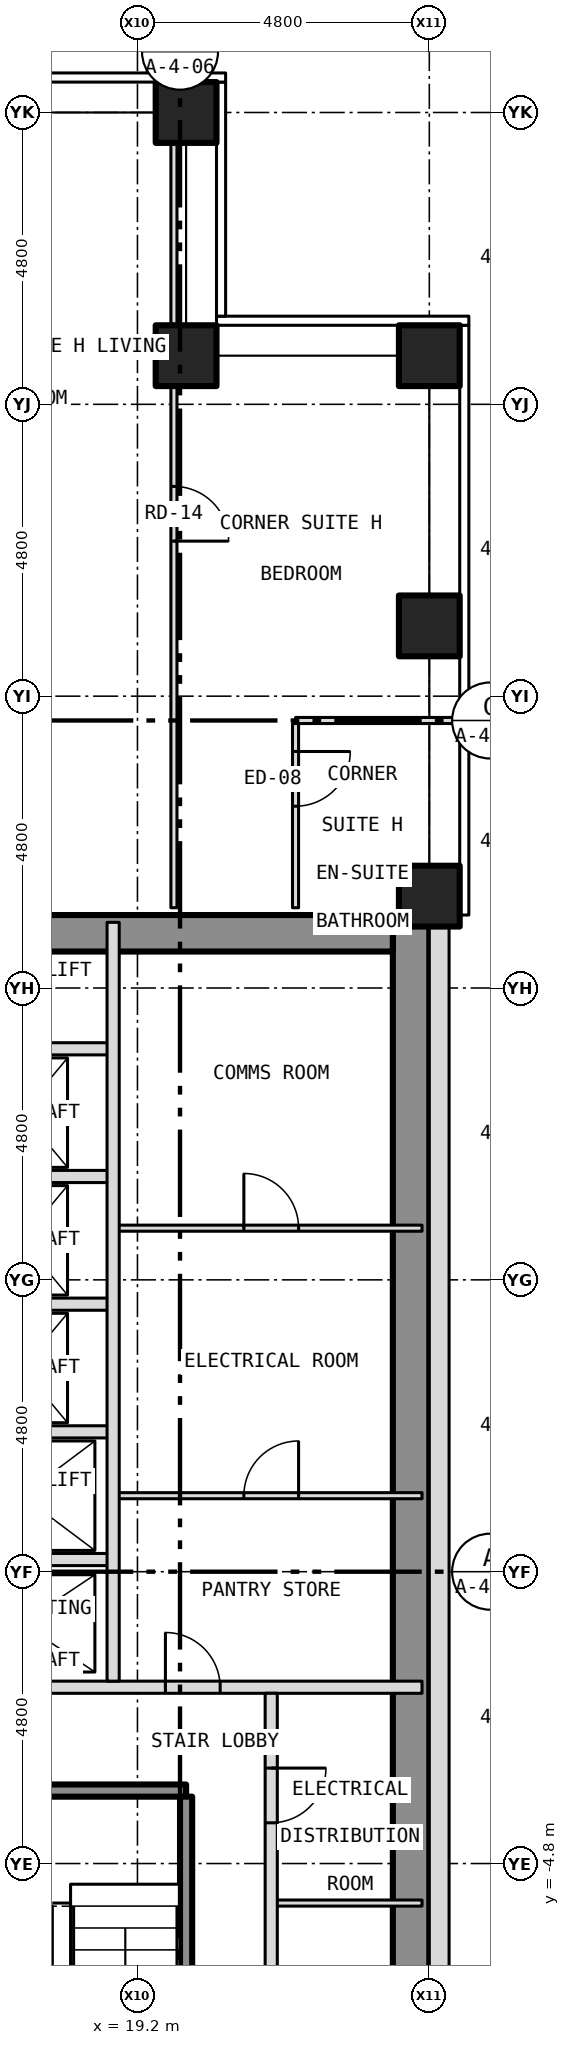
"""IFC4 building model, lengths in metres.
Left out: names, types, materials, properties, quantities, classifications, styles, units other than length and angle.
Written with IfcOpenShell. Run it as: python <this file> out.ifc"""

import sys

from ifc_helpers import new_model, si_unit, direction, frame, frame_2d, origin, origin_2d, place, context, subcontext, project, spatial, rectangle, hollow_rectangle, extrude, element, fill, save


model = new_model("IFC4")
c1 = context("Model", 3, precision=1e-05, world=origin(), true_north=direction((0.0, 1.0)))
c2 = subcontext(c1, "Body", "Model", "MODEL_VIEW")
j1 = project(units=[si_unit("LENGTHUNIT", "METRE"), si_unit("PLANEANGLEUNIT", "RADIAN")], contexts=[c1])
p1 = place(None, origin())
s1 = spatial("IfcSite", under=j1, at=p1, CompositionType="ELEMENT")
p2 = place(p1, origin())
s2 = spatial("IfcBuilding", under=s1, at=p2, CompositionType="ELEMENT")
p3 = place(p2, frame((0.0, 0.0, 67.0)))
s3 = spatial("IfcBuildingStorey", under=s2, at=p3, CompositionType="ELEMENT", Elevation=67.0)
for number, where, z_axis, x_axis in (
    (1, (20.0, 24.0, -0.15), (0.0, 0.0, 1.0), (1.0, 0.0, 0.0)),
    (2, (24.0, 11.111, -0.15), (0.0, 0.0, 1.0), (1.0, 0.0, 0.0)),
    (3, (24.0, 15.556, -0.15), (0.0, 0.0, 1.0), (1.0, 0.0, 0.0)),
    (4, (24.0, 20.0, -0.15), (0.0, 0.0, 1.0), (1.0, 0.0, 0.0)),
    (5, (20.0, 20.0, -0.15), (0.0, 0.0, 1.0), (1.0, 0.0, 0.0)),
):
    element("IfcColumn", number, at=place(p3, frame(where, z_axis=z_axis, x_axis=x_axis)), inside=s3, PredefinedType="COLUMN", context=c2, shape_type="SweptSolid", body=[
        extrude(hollow_rectangle(XDim=1.0, YDim=1.0, WallThickness=0.06, at=origin_2d()), origin(), (0.0, 0.0, 1.0), 3.5),
    ])
p4 = place(p3, frame((23.7, -10.8, 0.0), z_axis=(0.0, 0.0, 1.0), x_axis=(0.0, 1.0, 0.0)))
e6 = element("IfcWall", 6, at=p4, inside=s3, PredefinedType="SHEAR", context=c2, shape_type="SweptSolid", body=[
    extrude(rectangle(XDim=21.6, YDim=0.6, at=frame_2d((10.8, 0.0))), origin(), (0.0, 0.0, 1.0), 3.25),
])
p5 = place(p3, frame((16.4, 10.5, 0.0), z_axis=(0.0, 0.0, 1.0), x_axis=(1.0, 0.0, 0.0)))
e7 = element("IfcWall", 7, at=p5, inside=s3, PredefinedType="SHEAR", context=c2, shape_type="SweptSolid", body=[
    extrude(rectangle(XDim=7.0, YDim=0.6, at=frame_2d((3.5, 0.0))), origin(), (0.0, 0.0, 1.0), 3.25),
])
p6 = place(p3, frame((24.163, -10.8, 0.0), z_axis=(0.0, 0.0, 1.0), x_axis=(0.0, 1.0, 0.0)))
e8 = element("IfcWall", 8, at=p6, inside=s3, PredefinedType="SOLIDWALL", context=c2, shape_type="SweptSolid", body=[
    extrude(rectangle(XDim=21.6, YDim=0.325, at=frame_2d((10.8, 0.0))), origin(), (0.0, 0.0, 1.0), 3.5),
])
p7 = place(p6, frame((2.95, 0.0, 1.0)))
e9 = element("IfcOpeningElement", 9, at=p7, cuts=e8, PredefinedType="OPENING", context=c2, shape_type="SweptSolid", body=[
    extrude(rectangle(XDim=0.6, YDim=1.5, at=frame_2d((0.3, 0.75))), frame((0.0, 0.175, 0.0), z_axis=(0.0, -1.0, 0.0), x_axis=(1.0, 0.0, 0.0)), (0.0, 0.0, 1.0), 0.349),
])
p8 = place(p3, frame((21.4, -5.45, 0.0), z_axis=(0.0, 0.0, 1.0), x_axis=(1.0, 0.0, 0.0)))
e10 = element("IfcWall", 10, at=p8, inside=s3, PredefinedType="PARTITIONING", context=c2, shape_type="SweptSolid", body=[
    extrude(rectangle(XDim=2.48, YDim=0.1, at=frame_2d((1.24, 0.0))), origin(), (0.0, 0.0, 1.0), 3.25),
])
p9 = place(p3, frame((15.92, -3.6, 0.0), z_axis=(0.0, 0.0, 1.0), x_axis=(1.0, 0.0, 0.0)))
e11 = element("IfcWall", 11, at=p9, inside=s3, PredefinedType="SHEAR", context=c2, shape_type="SweptSolid", body=[
    extrude(rectangle(XDim=4.08, YDim=0.2, at=frame_2d((2.04, 0.0))), origin(), (0.0, 0.0, 1.0), 3.25),
])
p10 = place(p3, frame((15.92, -1.9, 0.0), z_axis=(0.0, 0.0, 1.0), x_axis=(1.0, 0.0, 0.0)))
e12 = element("IfcWall", 12, at=p10, inside=s3, PredefinedType="PARTITIONING", context=c2, shape_type="SweptSolid", body=[
    extrude(rectangle(XDim=7.96, YDim=0.2, at=frame_2d((3.98, 0.0))), origin(), (0.0, 0.0, 1.0), 3.25),
])
p11 = place(p10, frame((3.74, 0.0, 0.0)))
e13 = element("IfcOpeningElement", 13, at=p11, cuts=e12, PredefinedType="OPENING", context=c2, shape_type="SweptSolid", body=[
    extrude(rectangle(XDim=0.9, YDim=2.1, at=frame_2d((0.45, 1.05))), frame((0.0, 0.112, 0.0), z_axis=(0.0, -1.0, 0.0), x_axis=(1.0, 0.0, 0.0)), (0.0, 0.0, 1.0), 0.224),
])
p12 = place(p3, frame((15.92, 0.2, 0.0), z_axis=(0.0, 0.0, 1.0), x_axis=(1.0, 0.0, 0.0)))
e14 = element("IfcWall", 14, at=p12, inside=s3, PredefinedType="PARTITIONING", context=c2, shape_type="SweptSolid", body=[
    extrude(rectangle(XDim=2.88, YDim=0.2, at=frame_2d((1.44, 0.0))), origin(), (0.0, 0.0, 1.0), 3.25),
])
p13 = place(p3, frame((18.8, 1.25, 0.0), z_axis=(0.0, 0.0, 1.0), x_axis=(1.0, 0.0, 0.0)))
e15 = element("IfcWall", 15, at=p13, inside=s3, PredefinedType="PARTITIONING", context=c2, shape_type="SweptSolid", body=[
    extrude(rectangle(XDim=5.08, YDim=0.1, at=frame_2d((2.54, 0.0))), origin(), (0.0, 0.0, 1.0), 3.25),
])
p14 = place(p13, frame((2.15, 0.0, 0.0)))
e16 = element("IfcOpeningElement", 16, at=p14, cuts=e15, PredefinedType="OPENING", context=c2, shape_type="SweptSolid", body=[
    extrude(rectangle(XDim=0.9, YDim=2.1, at=frame_2d((0.45, 1.05))), frame((0.0, 0.062, 0.0), z_axis=(0.0, -1.0, 0.0), x_axis=(1.0, 0.0, 0.0)), (0.0, 0.0, 1.0), 0.124),
])
for number, where, z_axis, x_axis in (
    (17, (15.92, 2.3, 0.0), (0.0, 0.0, 1.0), (1.0, 0.0, 0.0)),
    (18, (15.92, 4.4, 0.0), (0.0, 0.0, 1.0), (1.0, 0.0, 0.0)),
):
    element("IfcWall", number, at=place(p3, frame(where, z_axis=z_axis, x_axis=x_axis)), inside=s3, PredefinedType="PARTITIONING", context=c2, shape_type="SweptSolid", body=[
        extrude(rectangle(XDim=2.88, YDim=0.2, at=frame_2d((1.44, 0.0))), origin(), (0.0, 0.0, 1.0), 3.25),
    ])
p15 = place(p3, frame((18.8, 5.65, 0.0), z_axis=(0.0, 0.0, 1.0), x_axis=(1.0, 0.0, 0.0)))
e19 = element("IfcWall", 19, at=p15, inside=s3, PredefinedType="PARTITIONING", context=c2, shape_type="SweptSolid", body=[
    extrude(rectangle(XDim=5.08, YDim=0.1, at=frame_2d((2.54, 0.0))), origin(), (0.0, 0.0, 1.0), 3.25),
])
p16 = place(p15, frame((2.15, 0.0, 0.0)))
e20 = element("IfcOpeningElement", 20, at=p16, cuts=e19, PredefinedType="OPENING", context=c2, shape_type="SweptSolid", body=[
    extrude(rectangle(XDim=0.9, YDim=2.1, at=frame_2d((0.45, 1.05))), frame((0.0, 0.062, 0.0), z_axis=(0.0, -1.0, 0.0), x_axis=(1.0, 0.0, 0.0)), (0.0, 0.0, 1.0), 0.124),
])
for number, where, z_axis, x_axis in (
    (21, (15.92, 6.5, 0.0), (0.0, 0.0, 1.0), (1.0, 0.0, 0.0)),
    (22, (15.92, 8.6, 0.0), (0.0, 0.0, 1.0), (1.0, 0.0, 0.0)),
):
    element("IfcWall", number, at=place(p3, frame(where, z_axis=z_axis, x_axis=x_axis)), inside=s3, PredefinedType="PARTITIONING", context=c2, shape_type="SweptSolid", body=[
        extrude(rectangle(XDim=2.88, YDim=0.2, at=frame_2d((1.44, 0.0))), origin(), (0.0, 0.0, 1.0), 3.25),
    ])
p17 = place(p3, frame((21.8, 14.0, 0.0), z_axis=(0.0, 0.0, 1.0), x_axis=(1.0, 0.0, 0.0)))
e23 = element("IfcWall", 23, at=p17, inside=s3, PredefinedType="PARTITIONING", context=c2, shape_type="SweptSolid", body=[
    extrude(rectangle(XDim=2.73, YDim=0.1, at=frame_2d((1.365, 0.0))), origin(), (0.0, 0.0, 1.0), 3.35),
])
p18 = place(p3, frame((18.8, -1.8, 0.0), z_axis=(0.0, 0.0, 1.0), x_axis=(0.0, 1.0, 0.0)))
e24 = element("IfcWall", 24, at=p18, inside=s3, PredefinedType="PARTITIONING", context=c2, shape_type="SweptSolid", body=[
    extrude(rectangle(XDim=12.48, YDim=0.2, at=frame_2d((6.24, 0.0))), origin(), (0.0, 0.0, 1.0), 3.25),
])
p19 = place(p3, frame((19.8, 10.92, 0.0), z_axis=(0.0, 0.0, 1.0), x_axis=(0.0, 1.0, 0.0)))
e25 = element("IfcWall", 25, at=p19, inside=s3, PredefinedType="PARTITIONING", context=c2, shape_type="SweptSolid", body=[
    extrude(rectangle(XDim=12.96, YDim=0.1, at=frame_2d((6.48, 0.0))), origin(), (0.0, 0.0, 1.0), 3.35),
])
p20 = place(p19, frame((6.03, 0.0, 0.0)))
e26 = element("IfcOpeningElement", 26, at=p20, cuts=e25, PredefinedType="OPENING", context=c2, shape_type="SweptSolid", body=[
    extrude(rectangle(XDim=0.9, YDim=2.1, at=frame_2d((0.45, 1.05))), frame((0.0, 0.062, 0.0), z_axis=(0.0, -1.0, 0.0), x_axis=(1.0, 0.0, 0.0)), (0.0, 0.0, 1.0), 0.124),
])
p21 = place(p3, frame((20.0, -10.68, 0.0), z_axis=(0.0, 0.0, 1.0), x_axis=(0.0, 1.0, 0.0)))
e27 = element("IfcWall", 27, at=p21, inside=s3, PredefinedType="SHEAR", context=c2, shape_type="SweptSolid", body=[
    extrude(rectangle(XDim=6.98, YDim=0.2, at=frame_2d((3.49, 0.0))), origin(), (0.0, 0.0, 1.0), 3.25),
])
p22 = place(p3, frame((21.4, -10.68, 0.0), z_axis=(0.0, 0.0, 1.0), x_axis=(0.0, 1.0, 0.0)))
e28 = element("IfcWall", 28, at=p22, inside=s3, PredefinedType="PARTITIONING", context=c2, shape_type="SweptSolid", body=[
    extrude(rectangle(XDim=8.68, YDim=0.2, at=frame_2d((4.34, 0.0))), origin(), (0.0, 0.0, 1.0), 3.25),
])
p23 = place(p22, frame((2.1, 0.0, 0.0)))
e29 = element("IfcOpeningElement", 29, at=p23, cuts=e28, PredefinedType="OPENING", context=c2, shape_type="SweptSolid", body=[
    extrude(rectangle(XDim=0.9, YDim=2.1, at=frame_2d((0.45, 1.05))), frame((0.0, 0.112, 0.0), z_axis=(0.0, -1.0, 0.0), x_axis=(1.0, 0.0, 0.0)), (0.0, 0.0, 1.0), 0.224),
])
p24 = place(p22, frame((6.55, 0.0, 0.0)))
e30 = element("IfcOpeningElement", 30, at=p24, cuts=e28, PredefinedType="OPENING", context=c2, shape_type="SweptSolid", body=[
    extrude(rectangle(XDim=0.9, YDim=2.1, at=frame_2d((0.45, 1.05))), frame((0.0, 0.112, 0.0), z_axis=(0.0, -1.0, 0.0), x_axis=(1.0, 0.0, 0.0)), (0.0, 0.0, 1.0), 0.224),
])
p25 = place(p3, frame((21.8, 10.92, 0.0), z_axis=(0.0, 0.0, 1.0), x_axis=(0.0, 1.0, 0.0)))
e31 = element("IfcWall", 31, at=p25, inside=s3, PredefinedType="PARTITIONING", context=c2, shape_type="SweptSolid", body=[
    extrude(rectangle(XDim=3.03, YDim=0.1, at=frame_2d((1.515, 0.0))), origin(), (0.0, 0.0, 1.0), 3.35),
])
p26 = place(p25, frame((1.67, 0.0, 0.0)))
e32 = element("IfcOpeningElement", 32, at=p26, cuts=e31, PredefinedType="OPENING", context=c2, shape_type="SweptSolid", body=[
    extrude(rectangle(XDim=0.9, YDim=2.1, at=frame_2d((0.45, 1.05))), frame((0.0, 0.062, 0.0), z_axis=(0.0, -1.0, 0.0), x_axis=(1.0, 0.0, 0.0)), (0.0, 0.0, 1.0), 0.124),
])
p27 = place(p24, origin())
e33 = element("IfcDoor", 33, at=p27, inside=s3, OperationType="SINGLE_SWING_RIGHT", PredefinedType="DOOR", context=c2, shape_type="SweptSolid", body=[
    extrude(rectangle(XDim=0.9, YDim=2.1, at=frame_2d((0.45, 1.05))), frame((0.0, 0.025, 0.0), z_axis=(0.0, -1.0, 0.0), x_axis=(1.0, 0.0, 0.0)), (0.0, 0.0, 1.0), 0.05),
])
fill(e30, e33)
p28 = place(p11, origin())
e34 = element("IfcDoor", 34, at=p28, inside=s3, OperationType="SINGLE_SWING_LEFT", PredefinedType="DOOR", context=c2, shape_type="SweptSolid", body=[
    extrude(rectangle(XDim=0.9, YDim=2.1, at=frame_2d((0.45, 1.05))), frame((0.0, 0.025, 0.0), z_axis=(0.0, -1.0, 0.0), x_axis=(1.0, 0.0, 0.0)), (0.0, 0.0, 1.0), 0.05),
])
fill(e13, e34)
p29 = place(p14, origin())
e35 = element("IfcDoor", 35, at=p29, inside=s3, OperationType="SINGLE_SWING_RIGHT", PredefinedType="DOOR", context=c2, shape_type="SweptSolid", body=[
    extrude(rectangle(XDim=0.9, YDim=2.1, at=frame_2d((0.45, 1.05))), frame((0.0, 0.025, 0.0), z_axis=(0.0, -1.0, 0.0), x_axis=(1.0, 0.0, 0.0)), (0.0, 0.0, 1.0), 0.05),
])
fill(e16, e35)
p30 = place(p16, origin())
e36 = element("IfcDoor", 36, at=p30, inside=s3, OperationType="SINGLE_SWING_LEFT", PredefinedType="DOOR", context=c2, shape_type="SweptSolid", body=[
    extrude(rectangle(XDim=0.9, YDim=2.1, at=frame_2d((0.45, 1.05))), frame((0.0, 0.025, 0.0), z_axis=(0.0, -1.0, 0.0), x_axis=(1.0, 0.0, 0.0)), (0.0, 0.0, 1.0), 0.05),
])
fill(e20, e36)
p31 = place(p20, origin())
e37 = element("IfcDoor", 37, at=p31, inside=s3, OperationType="SINGLE_SWING_LEFT", PredefinedType="DOOR", context=c2, shape_type="SweptSolid", body=[
    extrude(rectangle(XDim=0.9, YDim=2.1, at=frame_2d((0.45, 1.05))), frame((0.0, 0.025, 0.0), z_axis=(0.0, -1.0, 0.0), x_axis=(1.0, 0.0, 0.0)), (0.0, 0.0, 1.0), 0.05),
])
fill(e26, e37)
p32 = place(p26, origin())
e38 = element("IfcDoor", 38, at=p32, inside=s3, OperationType="SINGLE_SWING_RIGHT", PredefinedType="DOOR", context=c2, shape_type="SweptSolid", body=[
    extrude(rectangle(XDim=0.9, YDim=2.1, at=frame_2d((0.45, 1.05))), frame((0.0, 0.025, 0.0), z_axis=(0.0, -1.0, 0.0), x_axis=(1.0, 0.0, 0.0)), (0.0, 0.0, 1.0), 0.05),
])
fill(e32, e38)
save(model, sys.argv[1])
